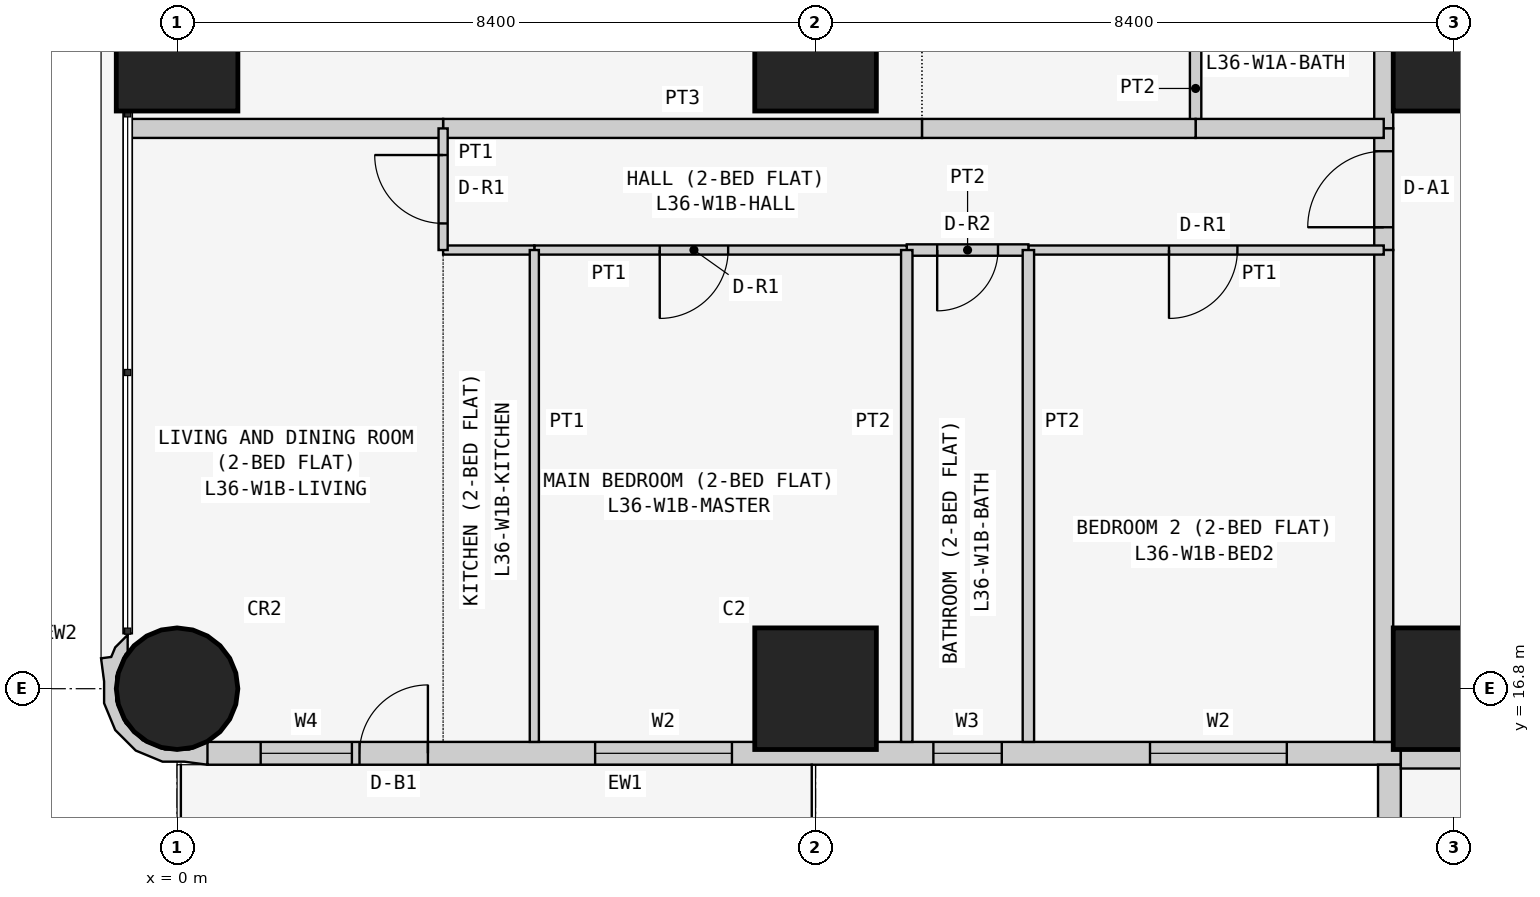
"""IFC4 building model, lengths in metres.
Left out: names, types, materials, properties, quantities, classifications, styles, units other than length and angle.
Written with IfcOpenShell. Run it as: python <this file> out.ifc"""

import sys

from ifc_helpers import new_model, si_unit, direction, frame, frame_2d, origin, origin_2d, place, context, subcontext, project, spatial, polyline, rectangle, circle, outline, extrude, element, fill, save


model = new_model("IFC4")
c1 = context("Model", 3, precision=1e-05, world=origin(), true_north=direction((0.0, 1.0)))
c2 = subcontext(c1, "Body", "Model", "MODEL_VIEW")
j1 = project(units=[si_unit("LENGTHUNIT", "METRE"), si_unit("PLANEANGLEUNIT", "RADIAN")], contexts=[c1])
p1 = place(None, origin())
s1 = spatial("IfcSite", under=j1, at=p1, CompositionType="ELEMENT")
p2 = place(p1, origin())
s2 = spatial("IfcBuilding", under=s1, at=p2, CompositionType="ELEMENT")
p3 = place(p2, frame((0.0, 0.0, 141.3)))
s3 = spatial("IfcBuildingStorey", under=s2, at=p3, CompositionType="ELEMENT", Elevation=141.3)
p4 = place(p3, frame((0.0, 16.8, 0.0), z_axis=(0.0, 0.0, 1.0), x_axis=(1.0, 0.0, 0.0)))
e1 = element("IfcColumn", 1, at=p4, inside=s3, PredefinedType="COLUMN", context=c2, shape_type="SweptSolid", body=[
    extrude(circle(Radius=0.8, at=origin_2d()), origin(), (0.0, 0.0, 1.0), 3.6),
])
for number, where, z_axis, x_axis in (
    (2, (0.0, 25.2, 0.0), (0.0, 0.0, 1.0), (1.0, 0.0, 0.0)),
    (3, (8.4, 16.8, 0.0), (0.0, 0.0, 1.0), (1.0, 0.0, 0.0)),
    (4, (8.4, 25.2, 0.0), (0.0, 0.0, 1.0), (1.0, 0.0, 0.0)),
    (5, (16.8, 16.8, 0.0), (0.0, 0.0, 1.0), (1.0, 0.0, 0.0)),
    (6, (16.8, 25.2, 0.0), (0.0, 0.0, 1.0), (1.0, 0.0, 0.0)),
):
    element("IfcColumn", number, at=place(p3, frame(where, z_axis=z_axis, x_axis=x_axis)), inside=s3, PredefinedType="COLUMN", context=c2, shape_type="SweptSolid", body=[
        extrude(rectangle(XDim=1.6, YDim=1.6, at=origin_2d()), origin(), (0.0, 0.0, 1.0), 3.6),
    ])
p5 = place(p3, frame((0.4, 15.95, 0.0), z_axis=(0.0, 0.0, 1.0), x_axis=(1.0, 0.0, 0.0)))
e7 = element("IfcWall", 7, at=p5, inside=s3, PredefinedType="SOLIDWALL", context=c2, shape_type="SweptSolid", body=[
    extrude(rectangle(XDim=15.7, YDim=0.3, at=frame_2d((7.85, 0.0))), origin(), (0.0, 0.0, 1.0), 3.45),
])
p6 = place(p5, frame((12.4, 0.0, 0.9)))
e8 = element("IfcOpeningElement", 8, at=p6, cuts=e7, PredefinedType="OPENING", context=c2, shape_type="SweptSolid", body=[
    extrude(rectangle(XDim=1.8, YDim=1.5, at=frame_2d((0.9, 0.75))), frame((0.0, 0.16, 0.0), z_axis=(0.0, -1.0, 0.0), x_axis=(1.0, 0.0, 0.0)), (0.0, 0.0, 1.0), 0.32),
])
p7 = place(p5, frame((9.55, 0.0, 1.5)))
e9 = element("IfcOpeningElement", 9, at=p7, cuts=e7, PredefinedType="OPENING", context=c2, shape_type="SweptSolid", body=[
    extrude(rectangle(XDim=0.9, YDim=0.7, at=frame_2d((0.45, 0.35))), frame((0.0, 0.16, 0.0), z_axis=(0.0, -1.0, 0.0), x_axis=(1.0, 0.0, 0.0)), (0.0, 0.0, 1.0), 0.32),
])
p8 = place(p5, frame((5.1, 0.0, 0.9)))
e10 = element("IfcOpeningElement", 10, at=p8, cuts=e7, PredefinedType="OPENING", context=c2, shape_type="SweptSolid", body=[
    extrude(rectangle(XDim=1.8, YDim=1.5, at=frame_2d((0.9, 0.75))), frame((0.0, 0.16, 0.0), z_axis=(0.0, -1.0, 0.0), x_axis=(1.0, 0.0, 0.0)), (0.0, 0.0, 1.0), 0.32),
])
p9 = place(p5, frame((2.0, 0.0, 0.0)))
e11 = element("IfcOpeningElement", 11, at=p9, cuts=e7, PredefinedType="OPENING", context=c2, shape_type="SweptSolid", body=[
    extrude(rectangle(XDim=0.9, YDim=2.4, at=frame_2d((0.45, 1.2))), frame((0.0, 0.16, 0.0), z_axis=(0.0, -1.0, 0.0), x_axis=(1.0, 0.0, 0.0)), (0.0, 0.0, 1.0), 0.32),
])
p10 = place(p5, frame((0.7, 0.0, 0.9)))
e12 = element("IfcOpeningElement", 12, at=p10, cuts=e7, PredefinedType="OPENING", context=c2, shape_type="SweptSolid", body=[
    extrude(rectangle(XDim=1.2, YDim=1.5, at=frame_2d((0.6, 0.75))), frame((0.0, 0.16, 0.0), z_axis=(0.0, -1.0, 0.0), x_axis=(1.0, 0.0, 0.0)), (0.0, 0.0, 1.0), 0.32),
])
p11 = place(p3, frame((15.95, 15.8, 0.0), z_axis=(0.0, 0.0, 1.0), x_axis=(0.0, -1.0, 0.0)))
e13 = element("IfcWall", 13, at=p11, inside=s3, PredefinedType="SOLIDWALL", context=c2, shape_type="SweptSolid", body=[
    extrude(rectangle(XDim=7.0, YDim=0.3, at=frame_2d((3.5, 0.0))), origin(), (0.0, 0.0, 1.0), 3.45),
])
p12 = place(p11, frame((1.5, 0.0, 0.9)))
e14 = element("IfcOpeningElement", 14, at=p12, cuts=e13, PredefinedType="OPENING", context=c2, shape_type="SweptSolid", body=[
    extrude(rectangle(XDim=2.4, YDim=1.5, at=frame_2d((1.2, 0.75))), frame((0.0, 0.16, 0.0), z_axis=(0.0, -1.0, 0.0), x_axis=(1.0, 0.0, 0.0)), (0.0, 0.0, 1.0), 0.32),
])
p13 = place(p11, frame((5.05, 0.0, 0.9)))
e15 = element("IfcOpeningElement", 15, at=p13, cuts=e13, PredefinedType="OPENING", context=c2, shape_type="SweptSolid", body=[
    extrude(rectangle(XDim=1.2, YDim=1.5, at=frame_2d((0.6, 0.75))), frame((0.0, 0.16, 0.0), z_axis=(0.0, -1.0, 0.0), x_axis=(1.0, 0.0, 0.0)), (0.0, 0.0, 1.0), 0.32),
])
p14 = place(p3, frame((-0.595, 17.448, 0.0), z_axis=(0.0, 0.0, 1.0), x_axis=(-0.93923434088, -0.343276641956, 0.0)))
e16 = element("IfcWall", 16, at=p14, inside=s3, PredefinedType="SOLIDWALL", context=c2, shape_type="SweptSolid", body=[
    extrude(outline(polyline([(-0.369, 1.89), (-0.509, 1.621), (-0.491, 1.614), (-0.479, 1.609), (-0.211, 1.62), (0.088, 1.511), (0.323, 1.295), (0.457, 1.006), (0.47, 0.688), (0.361, 0.389), (0.146, 0.154), (0.108, 0.137), (0.031, -0.075), (0.241, 0.023), (0.334, 0.124), (0.465, 0.094), (0.532, 0.393), (0.631, 0.663), (0.614, 1.045), (0.453, 1.391), (0.172, 1.649), (-0.098, 1.748), (-0.369, 1.89)])), origin(), (0.0, 0.0, 1.0), 3.45),
])
p15 = place(p3, frame((22.971, 15.875, 0.0), z_axis=(0.0, 0.0, 1.0), x_axis=(-1.0, 0.0, 0.0)))
e17 = element("IfcWall", 17, at=p15, inside=s3, PredefinedType="PARTITIONING", context=c2, shape_type="SweptSolid", body=[
    extrude(rectangle(XDim=6.871, YDim=0.25, at=frame_2d((3.436, 0.0))), origin(), (0.0, 0.0, 1.0), 3.45),
])
p16 = place(p3, frame((15.875, 24.171, 0.0), z_axis=(0.0, 0.0, 1.0), x_axis=(0.0, 1.0, 0.0)))
e18 = element("IfcWall", 18, at=p16, inside=s3, PredefinedType="PARTITIONING", context=c2, shape_type="SweptSolid", body=[
    extrude(rectangle(XDim=2.629, YDim=0.25, at=frame_2d((1.314, 0.0))), origin(), (0.0, 0.0, 1.0), 3.45),
])
p17 = place(p3, frame((15.875, 22.571, 0.0), z_axis=(0.0, 0.0, 1.0), x_axis=(0.0, 1.0, 0.0)))
e19 = element("IfcWall", 19, at=p17, inside=s3, PredefinedType="PARTITIONING", context=c2, shape_type="SweptSolid", body=[
    extrude(rectangle(XDim=1.6, YDim=0.25, at=frame_2d((0.8, 0.0))), origin(), (0.0, 0.0, 1.0), 3.45),
])
p18 = place(p17, frame((0.3, 0.0, 0.0)))
e20 = element("IfcOpeningElement", 20, at=p18, cuts=e19, PredefinedType="OPENING", context=c2, shape_type="SweptSolid", body=[
    extrude(rectangle(XDim=1.0, YDim=2.1, at=frame_2d((0.5, 1.05))), frame((0.0, 0.135, 0.0), z_axis=(0.0, -1.0, 0.0), x_axis=(1.0, 0.0, 0.0)), (0.0, 0.0, 1.0), 0.27),
])
p19 = place(p3, frame((15.875, 16.1, 0.0), z_axis=(0.0, 0.0, 1.0), x_axis=(0.0, 1.0, 0.0)))
e21 = element("IfcWall", 21, at=p19, inside=s3, PredefinedType="PARTITIONING", context=c2, shape_type="SweptSolid", body=[
    extrude(rectangle(XDim=6.471, YDim=0.25, at=frame_2d((3.235, 0.0))), origin(), (0.0, 0.0, 1.0), 3.45),
])
p20 = place(p3, frame((13.4, 26.8, 0.0), z_axis=(0.0, 0.0, 1.0), x_axis=(0.0, -1.0, 0.0)))
e22 = element("IfcWall", 22, at=p20, inside=s3, PredefinedType="PARTITIONING", context=c2, shape_type="SweptSolid", body=[
    extrude(rectangle(XDim=2.629, YDim=0.15, at=frame_2d((1.314, 0.0))), origin(), (0.0, 0.0, 1.0), 3.45),
])
p21 = place(p3, frame((13.4, 24.171, 0.0), z_axis=(0.0, 0.0, 1.0), x_axis=(1.0, 0.0, 0.0)))
e23 = element("IfcWall", 23, at=p21, inside=s3, PredefinedType="PARTITIONING", context=c2, shape_type="SweptSolid", body=[
    extrude(rectangle(XDim=2.475, YDim=0.25, at=frame_2d((1.238, 0.0))), origin(), (0.0, 0.0, 1.0), 3.45),
])
p22 = place(p3, frame((9.8, 24.171, 0.0), z_axis=(0.0, 0.0, 1.0), x_axis=(1.0, 0.0, 0.0)))
e24 = element("IfcWall", 24, at=p22, inside=s3, PredefinedType="PARTITIONING", context=c2, shape_type="SweptSolid", body=[
    extrude(rectangle(XDim=3.6, YDim=0.25, at=frame_2d((1.8, 0.0))), origin(), (0.0, 0.0, 1.0), 3.45),
])
p23 = place(p3, frame((3.5, 24.171, 0.0), z_axis=(0.0, 0.0, 1.0), x_axis=(1.0, 0.0, 0.0)))
e25 = element("IfcWall", 25, at=p23, inside=s3, PredefinedType="PARTITIONING", context=c2, shape_type="SweptSolid", body=[
    extrude(rectangle(XDim=6.3, YDim=0.25, at=frame_2d((3.15, 0.0))), origin(), (0.0, 0.0, 1.0), 3.45),
])
p24 = place(p3, frame((-0.65, 24.171, 0.0), z_axis=(0.0, 0.0, 1.0), x_axis=(1.0, 0.0, 0.0)))
e26 = element("IfcWall", 26, at=p24, inside=s3, PredefinedType="PARTITIONING", context=c2, shape_type="SweptSolid", body=[
    extrude(rectangle(XDim=4.15, YDim=0.25, at=frame_2d((2.075, 0.0))), origin(), (0.0, 0.0, 1.0), 3.45),
])
p25 = place(p3, frame((11.2, 22.571, 0.0), z_axis=(0.0, 0.0, 1.0), x_axis=(1.0, 0.0, 0.0)))
e27 = element("IfcWall", 27, at=p25, inside=s3, PredefinedType="PARTITIONING", context=c2, shape_type="SweptSolid", body=[
    extrude(rectangle(XDim=4.675, YDim=0.12, at=frame_2d((2.337, 0.0))), origin(), (0.0, 0.0, 1.0), 3.45),
])
p26 = place(p25, frame((1.85, 0.0, 0.0)))
e28 = element("IfcOpeningElement", 28, at=p26, cuts=e27, PredefinedType="OPENING", context=c2, shape_type="SweptSolid", body=[
    extrude(rectangle(XDim=0.9, YDim=2.1, at=frame_2d((0.45, 1.05))), frame((0.0, 0.07, 0.0), z_axis=(0.0, -1.0, 0.0), x_axis=(1.0, 0.0, 0.0)), (0.0, 0.0, 1.0), 0.14),
])
p27 = place(p3, frame((9.6, 22.571, 0.0), z_axis=(0.0, 0.0, 1.0), x_axis=(1.0, 0.0, 0.0)))
e29 = element("IfcWall", 29, at=p27, inside=s3, PredefinedType="PARTITIONING", context=c2, shape_type="SweptSolid", body=[
    extrude(rectangle(XDim=1.6, YDim=0.15, at=frame_2d((0.8, 0.0))), origin(), (0.0, 0.0, 1.0), 3.45),
])
p28 = place(p27, frame((0.4, 0.0, 0.0)))
e30 = element("IfcOpeningElement", 30, at=p28, cuts=e29, PredefinedType="OPENING", context=c2, shape_type="SweptSolid", body=[
    extrude(rectangle(XDim=0.8, YDim=2.1, at=frame_2d((0.4, 1.05))), frame((0.0, 0.085, 0.0), z_axis=(0.0, -1.0, 0.0), x_axis=(1.0, 0.0, 0.0)), (0.0, 0.0, 1.0), 0.17),
])
p29 = place(p3, frame((4.7, 22.571, 0.0), z_axis=(0.0, 0.0, 1.0), x_axis=(1.0, 0.0, 0.0)))
e31 = element("IfcWall", 31, at=p29, inside=s3, PredefinedType="PARTITIONING", context=c2, shape_type="SweptSolid", body=[
    extrude(rectangle(XDim=4.9, YDim=0.12, at=frame_2d((2.45, 0.0))), origin(), (0.0, 0.0, 1.0), 3.45),
])
p30 = place(p29, frame((1.65, 0.0, 0.0)))
e32 = element("IfcOpeningElement", 32, at=p30, cuts=e31, PredefinedType="OPENING", context=c2, shape_type="SweptSolid", body=[
    extrude(rectangle(XDim=0.9, YDim=2.1, at=frame_2d((0.45, 1.05))), frame((0.0, 0.07, 0.0), z_axis=(0.0, -1.0, 0.0), x_axis=(1.0, 0.0, 0.0)), (0.0, 0.0, 1.0), 0.14),
])
p31 = place(p3, frame((3.5, 22.571, 0.0), z_axis=(0.0, 0.0, 1.0), x_axis=(1.0, 0.0, 0.0)))
e33 = element("IfcWall", 33, at=p31, inside=s3, PredefinedType="PARTITIONING", context=c2, shape_type="SweptSolid", body=[
    extrude(rectangle(XDim=1.2, YDim=0.12, at=frame_2d((0.6, 0.0))), origin(), (0.0, 0.0, 1.0), 3.45),
])
p32 = place(p3, frame((3.5, 24.171, 0.0), z_axis=(0.0, 0.0, 1.0), x_axis=(0.0, -1.0, 0.0)))
e34 = element("IfcWall", 34, at=p32, inside=s3, PredefinedType="PARTITIONING", context=c2, shape_type="SweptSolid", body=[
    extrude(rectangle(XDim=1.6, YDim=0.12, at=frame_2d((0.8, 0.0))), origin(), (0.0, 0.0, 1.0), 3.45),
])
p33 = place(p32, frame((0.35, 0.0, 0.0)))
e35 = element("IfcOpeningElement", 35, at=p33, cuts=e34, PredefinedType="OPENING", context=c2, shape_type="SweptSolid", body=[
    extrude(rectangle(XDim=0.9, YDim=2.1, at=frame_2d((0.45, 1.05))), frame((0.0, 0.07, 0.0), z_axis=(0.0, -1.0, 0.0), x_axis=(1.0, 0.0, 0.0)), (0.0, 0.0, 1.0), 0.14),
])
for number, where, z_axis, x_axis in (
    (36, (11.2, 22.571, 0.0), (0.0, 0.0, 1.0), (0.0, -1.0, 0.0)),
    (37, (9.6, 22.571, 0.0), (0.0, 0.0, 1.0), (0.0, -1.0, 0.0)),
):
    element("IfcWall", number, at=place(p3, frame(where, z_axis=z_axis, x_axis=x_axis)), inside=s3, PredefinedType="PARTITIONING", context=c2, shape_type="SweptSolid", body=[
        extrude(rectangle(XDim=6.471, YDim=0.15, at=frame_2d((3.235, 0.0))), origin(), (0.0, 0.0, 1.0), 3.45),
    ])
p34 = place(p3, frame((4.7, 22.571, 0.0), z_axis=(0.0, 0.0, 1.0), x_axis=(0.0, -1.0, 0.0)))
e38 = element("IfcWall", 38, at=p34, inside=s3, PredefinedType="PARTITIONING", context=c2, shape_type="SweptSolid", body=[
    extrude(rectangle(XDim=6.471, YDim=0.12, at=frame_2d((3.235, 0.0))), origin(), (0.0, 0.0, 1.0), 3.45),
])
p35 = place(p6, origin())
e39 = element("IfcWindow", 39, at=p35, inside=s3, PartitioningType="SINGLE_PANEL", PredefinedType="WINDOW", context=c2, shape_type="SweptSolid", body=[
    extrude(rectangle(XDim=1.8, YDim=1.5, at=frame_2d((0.9, 0.75))), frame((0.0, 0.03, 0.0), z_axis=(0.0, -1.0, 0.0), x_axis=(1.0, 0.0, 0.0)), (0.0, 0.0, 1.0), 0.06),
])
fill(e8, e39)
p36 = place(p7, origin())
e40 = element("IfcWindow", 40, at=p36, inside=s3, PartitioningType="SINGLE_PANEL", PredefinedType="WINDOW", context=c2, shape_type="SweptSolid", body=[
    extrude(rectangle(XDim=0.9, YDim=0.7, at=frame_2d((0.45, 0.35))), frame((0.0, 0.03, 0.0), z_axis=(0.0, -1.0, 0.0), x_axis=(1.0, 0.0, 0.0)), (0.0, 0.0, 1.0), 0.06),
])
fill(e9, e40)
p37 = place(p8, origin())
e41 = element("IfcWindow", 41, at=p37, inside=s3, PartitioningType="SINGLE_PANEL", PredefinedType="WINDOW", context=c2, shape_type="SweptSolid", body=[
    extrude(rectangle(XDim=1.8, YDim=1.5, at=frame_2d((0.9, 0.75))), frame((0.0, 0.03, 0.0), z_axis=(0.0, -1.0, 0.0), x_axis=(1.0, 0.0, 0.0)), (0.0, 0.0, 1.0), 0.06),
])
fill(e10, e41)
p38 = place(p9, origin())
e42 = element("IfcDoor", 42, at=p38, inside=s3, OperationType="SINGLE_SWING_RIGHT", PredefinedType="DOOR", context=c2, shape_type="SweptSolid", body=[
    extrude(rectangle(XDim=0.9, YDim=2.4, at=frame_2d((0.45, 1.2))), frame((0.0, 0.025, 0.0), z_axis=(0.0, -1.0, 0.0), x_axis=(1.0, 0.0, 0.0)), (0.0, 0.0, 1.0), 0.05),
])
fill(e11, e42)
p39 = place(p10, origin())
e43 = element("IfcWindow", 43, at=p39, inside=s3, PartitioningType="SINGLE_PANEL", PredefinedType="WINDOW", context=c2, shape_type="SweptSolid", body=[
    extrude(rectangle(XDim=1.2, YDim=1.5, at=frame_2d((0.6, 0.75))), frame((0.0, 0.03, 0.0), z_axis=(0.0, -1.0, 0.0), x_axis=(1.0, 0.0, 0.0)), (0.0, 0.0, 1.0), 0.06),
])
fill(e12, e43)
p40 = place(p18, origin())
e44 = element("IfcDoor", 44, at=p40, inside=s3, OperationType="SINGLE_SWING_LEFT", PredefinedType="DOOR", context=c2, shape_type="SweptSolid", body=[
    extrude(rectangle(XDim=1.0, YDim=2.1, at=frame_2d((0.5, 1.05))), frame((0.0, 0.025, 0.0), z_axis=(0.0, -1.0, 0.0), x_axis=(1.0, 0.0, 0.0)), (0.0, 0.0, 1.0), 0.05),
])
fill(e20, e44)
p41 = place(p26, frame((0.9, 0.0, 0.0), z_axis=(0.0, 0.0, 1.0), x_axis=(-1.0, 0.0, 0.0)))
e45 = element("IfcDoor", 45, at=p41, inside=s3, OperationType="SINGLE_SWING_RIGHT", PredefinedType="DOOR", context=c2, shape_type="SweptSolid", body=[
    extrude(rectangle(XDim=0.9, YDim=2.1, at=frame_2d((0.45, 1.05))), frame((0.0, 0.025, 0.0), z_axis=(0.0, -1.0, 0.0), x_axis=(1.0, 0.0, 0.0)), (0.0, 0.0, 1.0), 0.05),
])
fill(e28, e45)
p42 = place(p28, frame((0.8, 0.0, 0.0), z_axis=(0.0, 0.0, 1.0), x_axis=(-1.0, 0.0, 0.0)))
e46 = element("IfcDoor", 46, at=p42, inside=s3, OperationType="SINGLE_SWING_RIGHT", PredefinedType="DOOR", context=c2, shape_type="SweptSolid", body=[
    extrude(rectangle(XDim=0.8, YDim=2.1, at=frame_2d((0.4, 1.05))), frame((0.0, 0.025, 0.0), z_axis=(0.0, -1.0, 0.0), x_axis=(1.0, 0.0, 0.0)), (0.0, 0.0, 1.0), 0.05),
])
fill(e30, e46)
p43 = place(p30, frame((0.9, 0.0, 0.0), z_axis=(0.0, 0.0, 1.0), x_axis=(-1.0, 0.0, 0.0)))
e47 = element("IfcDoor", 47, at=p43, inside=s3, OperationType="SINGLE_SWING_RIGHT", PredefinedType="DOOR", context=c2, shape_type="SweptSolid", body=[
    extrude(rectangle(XDim=0.9, YDim=2.1, at=frame_2d((0.45, 1.05))), frame((0.0, 0.025, 0.0), z_axis=(0.0, -1.0, 0.0), x_axis=(1.0, 0.0, 0.0)), (0.0, 0.0, 1.0), 0.05),
])
fill(e32, e47)
p44 = place(p33, frame((0.9, 0.0, 0.0), z_axis=(0.0, 0.0, 1.0), x_axis=(-1.0, 0.0, 0.0)))
e48 = element("IfcDoor", 48, at=p44, inside=s3, OperationType="SINGLE_SWING_RIGHT", PredefinedType="DOOR", context=c2, shape_type="SweptSolid", body=[
    extrude(rectangle(XDim=0.9, YDim=2.1, at=frame_2d((0.45, 1.05))), frame((0.0, 0.025, 0.0), z_axis=(0.0, -1.0, 0.0), x_axis=(1.0, 0.0, 0.0)), (0.0, 0.0, 1.0), 0.05),
])
fill(e35, e48)
save(model, sys.argv[1])
